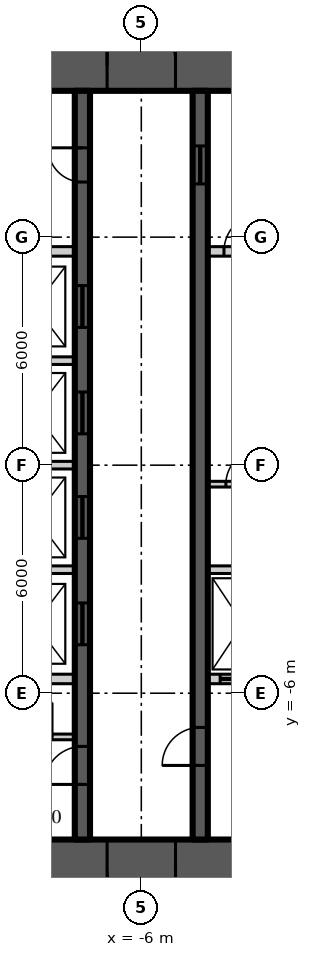
"""IFC4 building model, lengths in metres.
Left out: names, types, materials, properties, quantities, classifications, styles, units other than length and angle.
Written with IfcOpenShell. Run it as: python <this file> out.ifc"""

import sys

from ifc_helpers import new_model, si_unit, direction, frame, frame_2d, origin, place, context, subcontext, project, spatial, rectangle, extrude, element, fill, save


model = new_model("IFC4")
c1 = context("Model", 3, precision=1e-05, world=origin(), true_north=direction((0.0, 1.0)))
c2 = subcontext(c1, "Body", "Model", "MODEL_VIEW")
j1 = project(units=[si_unit("LENGTHUNIT", "METRE"), si_unit("PLANEANGLEUNIT", "RADIAN")], contexts=[c1])
p1 = place(None, origin())
s1 = spatial("IfcSite", under=j1, at=p1, CompositionType="ELEMENT")
p2 = place(p1, origin())
s2 = spatial("IfcBuilding", under=s1, at=p2, CompositionType="ELEMENT")
p3 = place(p2, frame((0.0, 0.0, 59.1)))
s3 = spatial("IfcBuildingStorey", under=s2, at=p3, CompositionType="ELEMENT", Elevation=59.1)
p4 = place(p3, frame((-11.15, 10.5, 0.0), z_axis=(0.0, 0.0, 1.0), x_axis=(1.0, 0.0, 0.0)))
e1 = element("IfcWall", 1, at=p4, inside=s3, PredefinedType="SHEAR", context=c2, shape_type="SweptSolid", body=[
    extrude(rectangle(XDim=22.3, YDim=1.3, at=frame_2d((11.15, 0.0))), origin(), (0.0, 0.0, 1.0), 3.9),
])
p5 = place(p4, frame((4.25, 0.0, 0.0)))
e2 = element("IfcOpeningElement", 2, at=p5, cuts=e1, PredefinedType="OPENING", context=c2, shape_type="SweptSolid", body=[
    extrude(rectangle(XDim=1.8, YDim=2.2, at=frame_2d((0.9, 1.1))), frame((0.0, 0.66, 0.0), z_axis=(0.0, -1.0, 0.0), x_axis=(1.0, 0.0, 0.0)), (0.0, 0.0, 1.0), 1.32),
])
p6 = place(p4, frame((16.25, 0.0, 0.0)))
e3 = element("IfcOpeningElement", 3, at=p6, cuts=e1, PredefinedType="OPENING", context=c2, shape_type="SweptSolid", body=[
    extrude(rectangle(XDim=1.8, YDim=2.2, at=frame_2d((0.9, 1.1))), frame((0.0, 0.66, 0.0), z_axis=(0.0, -1.0, 0.0), x_axis=(1.0, 0.0, 0.0)), (0.0, 0.0, 1.0), 1.32),
])
p7 = place(p3, frame((11.15, -10.5, 0.0), z_axis=(0.0, 0.0, 1.0), x_axis=(-1.0, 0.0, 0.0)))
e4 = element("IfcWall", 4, at=p7, inside=s3, PredefinedType="SHEAR", context=c2, shape_type="SweptSolid", body=[
    extrude(rectangle(XDim=22.3, YDim=1.3, at=frame_2d((11.15, 0.0))), origin(), (0.0, 0.0, 1.0), 3.9),
])
p8 = place(p7, frame((16.25, 0.0, 0.0)))
e5 = element("IfcOpeningElement", 5, at=p8, cuts=e4, PredefinedType="OPENING", context=c2, shape_type="SweptSolid", body=[
    extrude(rectangle(XDim=1.8, YDim=2.2, at=frame_2d((0.9, 1.1))), frame((0.0, 0.66, 0.0), z_axis=(0.0, -1.0, 0.0), x_axis=(1.0, 0.0, 0.0)), (0.0, 0.0, 1.0), 1.32),
])
p9 = place(p7, frame((4.25, 0.0, 0.0)))
e6 = element("IfcOpeningElement", 6, at=p9, cuts=e4, PredefinedType="OPENING", context=c2, shape_type="SweptSolid", body=[
    extrude(rectangle(XDim=1.8, YDim=2.2, at=frame_2d((0.9, 1.1))), frame((0.0, 0.66, 0.0), z_axis=(0.0, -1.0, 0.0), x_axis=(1.0, 0.0, 0.0)), (0.0, 0.0, 1.0), 1.32),
])
p10 = place(p3, frame((-7.55, -9.85, 0.0), z_axis=(0.0, 0.0, 1.0), x_axis=(0.0, 1.0, 0.0)))
e7 = element("IfcWall", 7, at=p10, inside=s3, PredefinedType="SHEAR", context=c2, shape_type="SweptSolid", body=[
    extrude(rectangle(XDim=19.7, YDim=0.4, at=frame_2d((9.85, 0.0))), origin(), (0.0, 0.0, 1.0), 3.9),
])
p11 = place(p10, frame((1.45, 0.0, 0.0)))
e8 = element("IfcOpeningElement", 8, at=p11, cuts=e7, PredefinedType="OPENING", context=c2, shape_type="SweptSolid", body=[
    extrude(rectangle(XDim=1.0, YDim=2.2, at=frame_2d((0.5, 1.1))), frame((0.0, 0.21, 0.0), z_axis=(0.0, -1.0, 0.0), x_axis=(1.0, 0.0, 0.0)), (0.0, 0.0, 1.0), 0.42),
])
p12 = place(p10, frame((17.3, 0.0, 0.0)))
e9 = element("IfcOpeningElement", 9, at=p12, cuts=e7, PredefinedType="OPENING", context=c2, shape_type="SweptSolid", body=[
    extrude(rectangle(XDim=0.9, YDim=2.1, at=frame_2d((0.45, 1.05))), frame((0.0, 0.21, 0.0), z_axis=(0.0, -1.0, 0.0), x_axis=(1.0, 0.0, 0.0)), (0.0, 0.0, 1.0), 0.42),
])
p13 = place(p10, frame((5.125, 0.0, 0.0)))
e10 = element("IfcOpeningElement", 10, at=p13, cuts=e7, PredefinedType="OPENING", context=c2, shape_type="SweptSolid", body=[
    extrude(rectangle(XDim=1.1, YDim=2.2, at=frame_2d((0.55, 1.1))), frame((0.0, 0.21, 0.0), z_axis=(0.0, -1.0, 0.0), x_axis=(1.0, 0.0, 0.0)), (0.0, 0.0, 1.0), 0.42),
])
p14 = place(p10, frame((7.925, 0.0, 0.0)))
e11 = element("IfcOpeningElement", 11, at=p14, cuts=e7, PredefinedType="OPENING", context=c2, shape_type="SweptSolid", body=[
    extrude(rectangle(XDim=1.1, YDim=2.2, at=frame_2d((0.55, 1.1))), frame((0.0, 0.21, 0.0), z_axis=(0.0, -1.0, 0.0), x_axis=(1.0, 0.0, 0.0)), (0.0, 0.0, 1.0), 0.42),
])
p15 = place(p10, frame((10.675, 0.0, 0.0)))
e12 = element("IfcOpeningElement", 12, at=p15, cuts=e7, PredefinedType="OPENING", context=c2, shape_type="SweptSolid", body=[
    extrude(rectangle(XDim=1.1, YDim=2.2, at=frame_2d((0.55, 1.1))), frame((0.0, 0.21, 0.0), z_axis=(0.0, -1.0, 0.0), x_axis=(1.0, 0.0, 0.0)), (0.0, 0.0, 1.0), 0.42),
])
p16 = place(p10, frame((13.475, 0.0, 0.0)))
e13 = element("IfcOpeningElement", 13, at=p16, cuts=e7, PredefinedType="OPENING", context=c2, shape_type="SweptSolid", body=[
    extrude(rectangle(XDim=1.1, YDim=2.2, at=frame_2d((0.55, 1.1))), frame((0.0, 0.21, 0.0), z_axis=(0.0, -1.0, 0.0), x_axis=(1.0, 0.0, 0.0)), (0.0, 0.0, 1.0), 0.42),
])
p17 = place(p3, frame((-4.45, -9.85, 0.0), z_axis=(0.0, 0.0, 1.0), x_axis=(0.0, 1.0, 0.0)))
e14 = element("IfcWall", 14, at=p17, inside=s3, PredefinedType="SHEAR", context=c2, shape_type="SweptSolid", body=[
    extrude(rectangle(XDim=19.7, YDim=0.4, at=frame_2d((9.85, 0.0))), origin(), (0.0, 0.0, 1.0), 3.9),
])
p18 = place(p17, frame((1.95, 0.0, 0.0)))
e15 = element("IfcOpeningElement", 15, at=p18, cuts=e14, PredefinedType="OPENING", context=c2, shape_type="SweptSolid", body=[
    extrude(rectangle(XDim=1.0, YDim=2.2, at=frame_2d((0.5, 1.1))), frame((0.0, 0.21, 0.0), z_axis=(0.0, -1.0, 0.0), x_axis=(1.0, 0.0, 0.0)), (0.0, 0.0, 1.0), 0.42),
])
p19 = place(p17, frame((17.25, 0.0, 0.0)))
e16 = element("IfcOpeningElement", 16, at=p19, cuts=e14, PredefinedType="OPENING", context=c2, shape_type="SweptSolid", body=[
    extrude(rectangle(XDim=1.0, YDim=2.1, at=frame_2d((0.5, 1.05))), frame((0.0, 0.21, 0.0), z_axis=(0.0, -1.0, 0.0), x_axis=(1.0, 0.0, 0.0)), (0.0, 0.0, 1.0), 0.42),
])
p20 = place(p3, frame((-9.85, 5.625, 0.0), z_axis=(0.0, 0.0, 1.0), x_axis=(1.0, 0.0, 0.0)))
e17 = element("IfcWall", 17, at=p20, inside=s3, PredefinedType="SOLIDWALL", context=c2, shape_type="SweptSolid", body=[
    extrude(rectangle(XDim=2.1, YDim=0.25, at=frame_2d((1.05, 0.0))), origin(), (0.0, 0.0, 1.0), 3.7),
])
p21 = place(p3, frame((-4.25, 5.625, 0.0), z_axis=(0.0, 0.0, 1.0), x_axis=(1.0, 0.0, 0.0)))
e18 = element("IfcWall", 18, at=p21, inside=s3, PredefinedType="SOLIDWALL", context=c2, shape_type="SweptSolid", body=[
    extrude(rectangle(XDim=1.85, YDim=0.25, at=frame_2d((0.925, 0.0))), origin(), (0.0, 0.0, 1.0), 3.7),
])
p22 = place(p21, frame((0.425, 0.0, 0.0)))
e19 = element("IfcOpeningElement", 19, at=p22, cuts=e18, PredefinedType="OPENING", context=c2, shape_type="SweptSolid", body=[
    extrude(rectangle(XDim=1.0, YDim=2.2, at=frame_2d((0.5, 1.1))), frame((0.0, 0.135, 0.0), z_axis=(0.0, -1.0, 0.0), x_axis=(1.0, 0.0, 0.0)), (0.0, 0.0, 1.0), 0.27),
])
p23 = place(p3, frame((-9.85, -5.625, 0.0), z_axis=(0.0, 0.0, 1.0), x_axis=(1.0, 0.0, 0.0)))
e20 = element("IfcWall", 20, at=p23, inside=s3, PredefinedType="SOLIDWALL", context=c2, shape_type="SweptSolid", body=[
    extrude(rectangle(XDim=2.1, YDim=0.25, at=frame_2d((1.05, 0.0))), origin(), (0.0, 0.0, 1.0), 3.7),
])
p24 = place(p3, frame((-4.25, -5.625, 0.0), z_axis=(0.0, 0.0, 1.0), x_axis=(1.0, 0.0, 0.0)))
e21 = element("IfcWall", 21, at=p24, inside=s3, PredefinedType="SOLIDWALL", context=c2, shape_type="SweptSolid", body=[
    extrude(rectangle(XDim=1.85, YDim=0.25, at=frame_2d((0.925, 0.0))), origin(), (0.0, 0.0, 1.0), 3.7),
])
p25 = place(p24, frame((0.325, 0.0, 0.0)))
e22 = element("IfcOpeningElement", 22, at=p25, cuts=e21, PredefinedType="OPENING", context=c2, shape_type="SweptSolid", body=[
    extrude(rectangle(XDim=1.2, YDim=2.2, at=frame_2d((0.6, 1.1))), frame((0.0, 0.135, 0.0), z_axis=(0.0, -1.0, 0.0), x_axis=(1.0, 0.0, 0.0)), (0.0, 0.0, 1.0), 0.27),
])
p26 = place(p3, frame((-9.85, -2.75, 0.0), z_axis=(0.0, 0.0, 1.0), x_axis=(1.0, 0.0, 0.0)))
e23 = element("IfcWall", 23, at=p26, inside=s3, PredefinedType="SOLIDWALL", context=c2, shape_type="SweptSolid", body=[
    extrude(rectangle(XDim=2.1, YDim=0.2, at=frame_2d((1.05, 0.0))), origin(), (0.0, 0.0, 1.0), 3.7),
])
p27 = place(p3, frame((-4.25, -2.75, 0.0), z_axis=(0.0, 0.0, 1.0), x_axis=(1.0, 0.0, 0.0)))
e24 = element("IfcWall", 24, at=p27, inside=s3, PredefinedType="SOLIDWALL", context=c2, shape_type="SweptSolid", body=[
    extrude(rectangle(XDim=1.85, YDim=0.2, at=frame_2d((0.925, 0.0))), origin(), (0.0, 0.0, 1.0), 3.7),
])
for number, where, z_axis, x_axis in (
    (25, (-9.85, 0.0, 0.0), (0.0, 0.0, 1.0), (1.0, 0.0, 0.0)),
    (26, (-9.85, 2.75, 0.0), (0.0, 0.0, 1.0), (1.0, 0.0, 0.0)),
):
    element("IfcWall", number, at=place(p3, frame(where, z_axis=z_axis, x_axis=x_axis)), inside=s3, PredefinedType="SOLIDWALL", context=c2, shape_type="SweptSolid", body=[
        extrude(rectangle(XDim=2.1, YDim=0.2, at=frame_2d((1.05, 0.0))), origin(), (0.0, 0.0, 1.0), 3.7),
    ])
p28 = place(p3, frame((-4.25, -0.5, 0.0), z_axis=(0.0, 0.0, 1.0), x_axis=(1.0, 0.0, 0.0)))
e27 = element("IfcWall", 27, at=p28, inside=s3, PredefinedType="SOLIDWALL", context=c2, shape_type="SweptSolid", body=[
    extrude(rectangle(XDim=1.85, YDim=0.15, at=frame_2d((0.925, 0.0))), origin(), (0.0, 0.0, 1.0), 3.77),
])
p29 = place(p28, frame((0.475, 0.0, 0.0)))
e28 = element("IfcOpeningElement", 28, at=p29, cuts=e27, PredefinedType="OPENING", context=c2, shape_type="SweptSolid", body=[
    extrude(rectangle(XDim=0.9, YDim=2.1, at=frame_2d((0.45, 1.05))), frame((0.0, 0.085, 0.0), z_axis=(0.0, -1.0, 0.0), x_axis=(1.0, 0.0, 0.0)), (0.0, 0.0, 1.0), 0.17),
])
p30 = place(p3, frame((-9.85, -7.15, 0.0), z_axis=(0.0, 0.0, 1.0), x_axis=(1.0, 0.0, 0.0)))
e29 = element("IfcWall", 29, at=p30, inside=s3, PredefinedType="SOLIDWALL", context=c2, shape_type="SweptSolid", body=[
    extrude(rectangle(XDim=2.1, YDim=0.15, at=frame_2d((1.05, 0.0))), origin(), (0.0, 0.0, 1.0), 3.77),
])
p31 = place(p30, frame((0.6, 0.0, 0.0)))
e30 = element("IfcOpeningElement", 30, at=p31, cuts=e29, PredefinedType="OPENING", context=c2, shape_type="SweptSolid", body=[
    extrude(rectangle(XDim=0.9, YDim=2.1, at=frame_2d((0.45, 1.05))), frame((0.0, 0.085, 0.0), z_axis=(0.0, -1.0, 0.0), x_axis=(1.0, 0.0, 0.0)), (0.0, 0.0, 1.0), 0.17),
])
p32 = place(p5, origin())
e31 = element("IfcDoor", 31, at=p32, inside=s3, OperationType="DOUBLE_DOOR_DOUBLE_SWING", PredefinedType="DOOR", context=c2, shape_type="SweptSolid", body=[
    extrude(rectangle(XDim=1.8, YDim=2.2, at=frame_2d((0.9, 1.1))), frame((0.0, 0.025, 0.0), z_axis=(0.0, -1.0, 0.0), x_axis=(1.0, 0.0, 0.0)), (0.0, 0.0, 1.0), 0.05),
])
fill(e2, e31)
p33 = place(p8, origin())
e32 = element("IfcDoor", 32, at=p33, inside=s3, OperationType="DOUBLE_DOOR_DOUBLE_SWING", PredefinedType="DOOR", context=c2, shape_type="SweptSolid", body=[
    extrude(rectangle(XDim=1.8, YDim=2.2, at=frame_2d((0.9, 1.1))), frame((0.0, 0.025, 0.0), z_axis=(0.0, -1.0, 0.0), x_axis=(1.0, 0.0, 0.0)), (0.0, 0.0, 1.0), 0.05),
])
fill(e5, e32)
p34 = place(p11, origin())
e33 = element("IfcDoor", 33, at=p34, inside=s3, OperationType="SINGLE_SWING_LEFT", PredefinedType="DOOR", context=c2, shape_type="SweptSolid", body=[
    extrude(rectangle(XDim=1.0, YDim=2.2, at=frame_2d((0.5, 1.1))), frame((0.0, 0.025, 0.0), z_axis=(0.0, -1.0, 0.0), x_axis=(1.0, 0.0, 0.0)), (0.0, 0.0, 1.0), 0.05),
])
fill(e8, e33)
p35 = place(p18, origin())
e34 = element("IfcDoor", 34, at=p35, inside=s3, OperationType="SINGLE_SWING_LEFT", PredefinedType="DOOR", context=c2, shape_type="SweptSolid", body=[
    extrude(rectangle(XDim=1.0, YDim=2.2, at=frame_2d((0.5, 1.1))), frame((0.0, 0.025, 0.0), z_axis=(0.0, -1.0, 0.0), x_axis=(1.0, 0.0, 0.0)), (0.0, 0.0, 1.0), 0.05),
])
fill(e15, e34)
p36 = place(p12, origin())
e35 = element("IfcDoor", 35, at=p36, inside=s3, OperationType="SINGLE_SWING_RIGHT", PredefinedType="DOOR", context=c2, shape_type="SweptSolid", body=[
    extrude(rectangle(XDim=0.9, YDim=2.1, at=frame_2d((0.45, 1.05))), frame((0.0, 0.025, 0.0), z_axis=(0.0, -1.0, 0.0), x_axis=(1.0, 0.0, 0.0)), (0.0, 0.0, 1.0), 0.05),
])
fill(e9, e35)
p37 = place(p19, origin())
e36 = element("IfcDoor", 36, at=p37, inside=s3, OperationType="SLIDING_TO_LEFT", PredefinedType="DOOR", context=c2, shape_type="SweptSolid", body=[
    extrude(rectangle(XDim=1.0, YDim=2.1, at=frame_2d((0.5, 1.05))), frame((0.0, 0.025, 0.0), z_axis=(0.0, -1.0, 0.0), x_axis=(1.0, 0.0, 0.0)), (0.0, 0.0, 1.0), 0.05),
])
fill(e16, e36)
p38 = place(p13, origin())
e37 = element("IfcDoor", 37, at=p38, inside=s3, OperationType="SLIDING_TO_LEFT", PredefinedType="DOOR", context=c2, shape_type="SweptSolid", body=[
    extrude(rectangle(XDim=1.1, YDim=2.2, at=frame_2d((0.55, 1.1))), frame((0.0, 0.025, 0.0), z_axis=(0.0, -1.0, 0.0), x_axis=(1.0, 0.0, 0.0)), (0.0, 0.0, 1.0), 0.05),
])
fill(e10, e37)
p39 = place(p14, origin())
e38 = element("IfcDoor", 38, at=p39, inside=s3, OperationType="SLIDING_TO_LEFT", PredefinedType="DOOR", context=c2, shape_type="SweptSolid", body=[
    extrude(rectangle(XDim=1.1, YDim=2.2, at=frame_2d((0.55, 1.1))), frame((0.0, 0.025, 0.0), z_axis=(0.0, -1.0, 0.0), x_axis=(1.0, 0.0, 0.0)), (0.0, 0.0, 1.0), 0.05),
])
fill(e11, e38)
p40 = place(p15, origin())
e39 = element("IfcDoor", 39, at=p40, inside=s3, OperationType="SLIDING_TO_LEFT", PredefinedType="DOOR", context=c2, shape_type="SweptSolid", body=[
    extrude(rectangle(XDim=1.1, YDim=2.2, at=frame_2d((0.55, 1.1))), frame((0.0, 0.025, 0.0), z_axis=(0.0, -1.0, 0.0), x_axis=(1.0, 0.0, 0.0)), (0.0, 0.0, 1.0), 0.05),
])
fill(e12, e39)
p41 = place(p16, origin())
e40 = element("IfcDoor", 40, at=p41, inside=s3, OperationType="SLIDING_TO_LEFT", PredefinedType="DOOR", context=c2, shape_type="SweptSolid", body=[
    extrude(rectangle(XDim=1.1, YDim=2.2, at=frame_2d((0.55, 1.1))), frame((0.0, 0.025, 0.0), z_axis=(0.0, -1.0, 0.0), x_axis=(1.0, 0.0, 0.0)), (0.0, 0.0, 1.0), 0.05),
])
fill(e13, e40)
p42 = place(p25, origin())
e41 = element("IfcDoor", 41, at=p42, inside=s3, OperationType="SLIDING_TO_LEFT", PredefinedType="DOOR", context=c2, shape_type="SweptSolid", body=[
    extrude(rectangle(XDim=1.2, YDim=2.2, at=frame_2d((0.6, 1.1))), frame((0.0, 0.025, 0.0), z_axis=(0.0, -1.0, 0.0), x_axis=(1.0, 0.0, 0.0)), (0.0, 0.0, 1.0), 0.05),
])
fill(e22, e41)
p43 = place(p29, origin())
e42 = element("IfcDoor", 42, at=p43, inside=s3, OperationType="SINGLE_SWING_RIGHT", PredefinedType="DOOR", context=c2, shape_type="SweptSolid", body=[
    extrude(rectangle(XDim=0.9, YDim=2.1, at=frame_2d((0.45, 1.05))), frame((0.0, 0.025, 0.0), z_axis=(0.0, -1.0, 0.0), x_axis=(1.0, 0.0, 0.0)), (0.0, 0.0, 1.0), 0.05),
])
fill(e28, e42)
p44 = place(p22, origin())
e43 = element("IfcDoor", 43, at=p44, inside=s3, OperationType="SINGLE_SWING_RIGHT", PredefinedType="DOOR", context=c2, shape_type="SweptSolid", body=[
    extrude(rectangle(XDim=1.0, YDim=2.2, at=frame_2d((0.5, 1.1))), frame((0.0, 0.025, 0.0), z_axis=(0.0, -1.0, 0.0), x_axis=(1.0, 0.0, 0.0)), (0.0, 0.0, 1.0), 0.05),
])
fill(e19, e43)
save(model, sys.argv[1])
